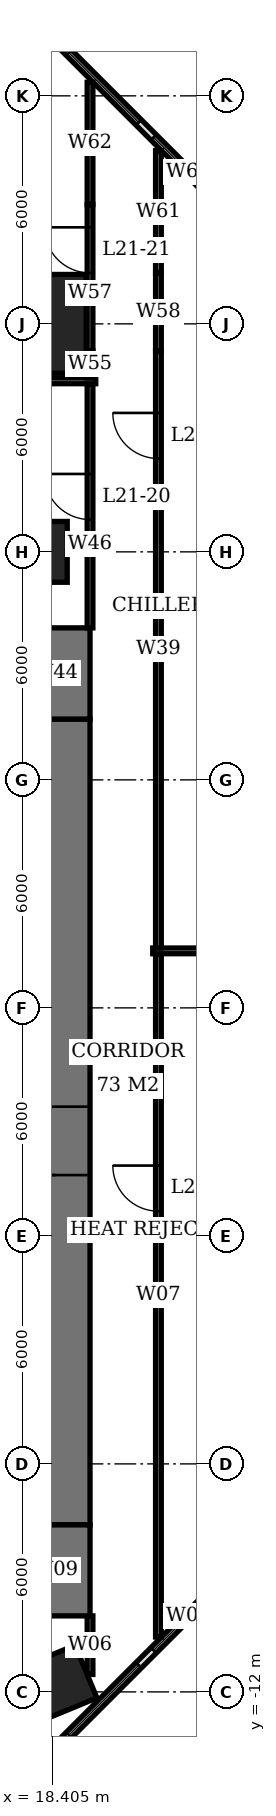
"""IFC4 building model, lengths in metres.
Left out: names, types, materials, properties, quantities, classifications, styles, units other than length and angle.
Written with IfcOpenShell. Run it as: python <this file> out.ifc"""

import sys

from ifc_helpers import new_model, si_unit, direction, frame, frame_2d, origin, origin_2d, place, context, subcontext, project, spatial, rectangle, extrude, element, fill, save


model = new_model("IFC4")
c1 = context("Model", 3, precision=1e-05, world=origin(), true_north=direction((0.0, 1.0)))
c2 = subcontext(c1, "Body", "Model", "MODEL_VIEW")
j1 = project(units=[si_unit("LENGTHUNIT", "METRE"), si_unit("PLANEANGLEUNIT", "RADIAN")], contexts=[c1])
p1 = place(None, origin())
s1 = spatial("IfcSite", under=j1, at=p1, CompositionType="ELEMENT")
p2 = place(p1, origin())
s2 = spatial("IfcBuilding", under=s1, at=p2, CompositionType="ELEMENT")
p3 = place(p2, frame((0.0, 0.0, 88.4)))
s3 = spatial("IfcBuildingStorey", under=s2, at=p3, CompositionType="ELEMENT", Elevation=88.4)
p4 = place(p3, frame((18.0, -12.0, 0.0), z_axis=(0.0, 0.0, 1.0), x_axis=(-0.923879532511, -0.382683432365, 0.0)))
e1 = element("IfcColumn", 1, at=p4, inside=s3, PredefinedType="COLUMN", context=c2, shape_type="SweptSolid", body=[
    extrude(rectangle(XDim=2.8, YDim=1.5, at=origin_2d()), origin(), (0.0, 0.0, 1.0), 5.4),
])
p5 = place(p3, frame((18.0, 18.0, 0.0), z_axis=(0.0, 0.0, 1.0), x_axis=(1.0, 0.0, 0.0)))
e2 = element("IfcColumn", 2, at=p5, inside=s3, PredefinedType="COLUMN", context=c2, shape_type="SweptSolid", body=[
    extrude(rectangle(XDim=1.6, YDim=1.6, at=origin_2d()), origin(), (0.0, 0.0, 1.0), 5.4),
])
p6 = place(p3, frame((18.0, 24.0, 0.0), z_axis=(0.0, 0.0, 1.0), x_axis=(1.0, 0.0, 0.0)))
e3 = element("IfcColumn", 3, at=p6, inside=s3, PredefinedType="COLUMN", context=c2, shape_type="SweptSolid", body=[
    extrude(rectangle(XDim=2.6, YDim=2.6, at=origin_2d()), origin(), (0.0, 0.0, 1.0), 5.4),
])
p7 = place(p3, frame((18.5, -7.6, 0.0), z_axis=(0.0, 0.0, 1.0), x_axis=(0.0, 1.0, 0.0)))
e4 = element("IfcWall", 4, at=p7, inside=s3, PredefinedType="SHEAR", context=c2, shape_type="SweptSolid", body=[
    extrude(rectangle(XDim=21.2, YDim=1.8, at=frame_2d((10.6, 0.0))), origin(), (0.0, 0.0, 1.0), 5.4),
])
p8 = place(p7, frame((9.2, 0.0, 0.0)))
e5 = element("IfcOpeningElement", 5, at=p8, cuts=e4, PredefinedType="OPENING", context=c2, shape_type="SweptSolid", body=[
    extrude(rectangle(XDim=1.8, YDim=2.4, at=frame_2d((0.9, 1.2))), frame((0.0, 0.91, 0.0), z_axis=(0.0, -1.0, 0.0), x_axis=(1.0, 0.0, 0.0)), (0.0, 0.0, 1.0), 1.82),
])
for number, where, z_axis, x_axis in (
    (6, (18.5, -10.0, 0.0), (0.0, 0.0, 1.0), (0.0, 1.0, 0.0)),
    (7, (18.5, 13.6, 0.0), (0.0, 0.0, 1.0), (0.0, 1.0, 0.0)),
):
    element("IfcWall", number, at=place(p3, frame(where, z_axis=z_axis, x_axis=x_axis)), inside=s3, PredefinedType="SHEAR", context=c2, shape_type="SweptSolid", body=[
        extrude(rectangle(XDim=2.4, YDim=1.8, at=frame_2d((1.2, 0.0))), origin(), (0.0, 0.0, 1.0), 5.4),
    ])
p9 = place(p3, frame((18.651, -13.329, 0.0), z_axis=(0.0, 0.0, 1.0), x_axis=(0.707106781187, 0.707106781187, 0.0)))
e8 = element("IfcWall", 8, at=p9, inside=s3, PredefinedType="USERDEFINED", context=c2, shape_type="SweptSolid", body=[
    extrude(rectangle(XDim=9.445, YDim=0.2, at=frame_2d((4.723, 0.0))), origin(), (0.0, 0.0, 1.0), 5.4),
])
p10 = place(p9, frame((0.274, 0.0, 0.6)))
e9 = element("IfcOpeningElement", 9, at=p10, cuts=e8, PredefinedType="OPENING", context=c2, shape_type="SweptSolid", body=[
    extrude(rectangle(XDim=2.6, YDim=3.0, at=frame_2d((1.3, 1.5))), frame((0.0, 0.11, 0.0), z_axis=(0.0, -1.0, 0.0), x_axis=(1.0, 0.0, 0.0)), (0.0, 0.0, 1.0), 0.22),
])
p11 = place(p9, frame((3.423, 0.0, 0.6)))
e10 = element("IfcOpeningElement", 10, at=p11, cuts=e8, PredefinedType="OPENING", context=c2, shape_type="SweptSolid", body=[
    extrude(rectangle(XDim=2.6, YDim=3.0, at=frame_2d((1.3, 1.5))), frame((0.0, 0.11, 0.0), z_axis=(0.0, -1.0, 0.0), x_axis=(1.0, 0.0, 0.0)), (0.0, 0.0, 1.0), 0.22),
])
p12 = place(p9, frame((6.571, 0.0, 0.6)))
e11 = element("IfcOpeningElement", 11, at=p12, cuts=e8, PredefinedType="OPENING", context=c2, shape_type="SweptSolid", body=[
    extrude(rectangle(XDim=2.6, YDim=3.0, at=frame_2d((1.3, 1.5))), frame((0.0, 0.11, 0.0), z_axis=(0.0, -1.0, 0.0), x_axis=(1.0, 0.0, 0.0)), (0.0, 0.0, 1.0), 0.22),
])
p13 = place(p3, frame((25.329, 24.651, 0.0), z_axis=(0.0, 0.0, 1.0), x_axis=(-0.707106781187, 0.707106781187, 0.0)))
e12 = element("IfcWall", 12, at=p13, inside=s3, PredefinedType="USERDEFINED", context=c2, shape_type="SweptSolid", body=[
    extrude(rectangle(XDim=9.445, YDim=0.2, at=frame_2d((4.723, 0.0))), origin(), (0.0, 0.0, 1.0), 5.4),
])
p14 = place(p13, frame((0.274, 0.0, 0.6)))
e13 = element("IfcOpeningElement", 13, at=p14, cuts=e12, PredefinedType="OPENING", context=c2, shape_type="SweptSolid", body=[
    extrude(rectangle(XDim=2.6, YDim=3.0, at=frame_2d((1.3, 1.5))), frame((0.0, 0.11, 0.0), z_axis=(0.0, -1.0, 0.0), x_axis=(1.0, 0.0, 0.0)), (0.0, 0.0, 1.0), 0.22),
])
p15 = place(p13, frame((3.423, 0.0, 0.6)))
e14 = element("IfcOpeningElement", 14, at=p15, cuts=e12, PredefinedType="OPENING", context=c2, shape_type="SweptSolid", body=[
    extrude(rectangle(XDim=2.6, YDim=3.0, at=frame_2d((1.3, 1.5))), frame((0.0, 0.11, 0.0), z_axis=(0.0, -1.0, 0.0), x_axis=(1.0, 0.0, 0.0)), (0.0, 0.0, 1.0), 0.22),
])
p16 = place(p13, frame((6.571, 0.0, 0.6)))
e15 = element("IfcOpeningElement", 15, at=p16, cuts=e12, PredefinedType="OPENING", context=c2, shape_type="SweptSolid", body=[
    extrude(rectangle(XDim=2.6, YDim=3.0, at=frame_2d((1.3, 1.5))), frame((0.0, 0.11, 0.0), z_axis=(0.0, -1.0, 0.0), x_axis=(1.0, 0.0, 0.0)), (0.0, 0.0, 1.0), 0.22),
])
p17 = place(p3, frame((4.575, 22.5, 0.0), z_axis=(0.0, 0.0, 1.0), x_axis=(1.0, 0.0, 0.0)))
e16 = element("IfcWall", 16, at=p17, inside=s3, PredefinedType="PARTITIONING", context=c2, shape_type="SweptSolid", body=[
    extrude(rectangle(XDim=14.975, YDim=0.15, at=frame_2d((7.488, 0.0))), origin(), (0.0, 0.0, 1.0), 5.15),
])
p18 = place(p3, frame((19.4, -11.541, 0.0), z_axis=(0.0, 0.0, 1.0), x_axis=(0.0, 1.0, 0.0)))
e17 = element("IfcWall", 17, at=p18, inside=s3, PredefinedType="PARTITIONING", context=c2, shape_type="SweptSolid", body=[
    extrude(rectangle(XDim=1.541, YDim=0.15, at=frame_2d((0.77, 0.0))), origin(), (0.0, 0.0, 1.0), 5.15),
])
p19 = place(p3, frame((19.4, 16.0, 0.0), z_axis=(0.0, 0.0, 1.0), x_axis=(0.0, 1.0, 0.0)))
e18 = element("IfcWall", 18, at=p19, inside=s3, PredefinedType="PARTITIONING", context=c2, shape_type="SweptSolid", body=[
    extrude(rectangle(XDim=6.425, YDim=0.15, at=frame_2d((3.212, 0.0))), origin(), (0.0, 0.0, 1.0), 5.15),
])
p20 = place(p19, frame((2.85, 0.0, 0.0)))
e19 = element("IfcOpeningElement", 19, at=p20, cuts=e18, PredefinedType="OPENING", context=c2, shape_type="SweptSolid", body=[
    extrude(rectangle(XDim=1.2, YDim=2.4, at=frame_2d((0.6, 1.2))), frame((0.0, 0.085, 0.0), z_axis=(0.0, -1.0, 0.0), x_axis=(1.0, 0.0, 0.0)), (0.0, 0.0, 1.0), 0.17),
])
p21 = place(p3, frame((19.4, 22.575, 0.0), z_axis=(0.0, 0.0, 1.0), x_axis=(0.0, 1.0, 0.0)))
e20 = element("IfcWall", 20, at=p21, inside=s3, PredefinedType="PARTITIONING", context=c2, shape_type="SweptSolid", body=[
    extrude(rectangle(XDim=0.715, YDim=0.15, at=frame_2d((0.357, 0.0))), origin(), (0.0, 0.0, 1.0), 5.15),
])
p22 = place(p3, frame((19.4, 23.29, 0.0), z_axis=(0.0, 0.0, 1.0), x_axis=(0.0, 1.0, 0.0)))
e21 = element("IfcWall", 21, at=p22, inside=s3, PredefinedType="PARTITIONING", context=c2, shape_type="SweptSolid", body=[
    extrude(rectangle(XDim=3.85, YDim=0.15, at=frame_2d((1.925, 0.0))), origin(), (0.0, 0.0, 1.0), 4.15),
])
p23 = place(p22, frame((2.05, 0.0, 0.0)))
e22 = element("IfcOpeningElement", 22, at=p23, cuts=e21, PredefinedType="OPENING", context=c2, shape_type="SweptSolid", body=[
    extrude(rectangle(XDim=1.2, YDim=2.4, at=frame_2d((0.6, 1.2))), frame((0.0, 0.085, 0.0), z_axis=(0.0, -1.0, 0.0), x_axis=(1.0, 0.0, 0.0)), (0.0, 0.0, 1.0), 0.17),
])
p24 = place(p3, frame((19.4, 27.14, 0.0), z_axis=(0.0, 0.0, 1.0), x_axis=(0.0, 1.0, 0.0)))
e23 = element("IfcWall", 23, at=p24, inside=s3, PredefinedType="PARTITIONING", context=c2, shape_type="SweptSolid", body=[
    extrude(rectangle(XDim=3.216, YDim=0.15, at=frame_2d((1.608, 0.0))), origin(), (0.0, 0.0, 1.0), 5.15),
])
p25 = place(p3, frame((21.2, -10.556, 0.0), z_axis=(0.0, 0.0, 1.0), x_axis=(0.0, 1.0, 0.0)))
e24 = element("IfcWall", 24, at=p25, inside=s3, PredefinedType="PARTITIONING", context=c2, shape_type="SweptSolid", body=[
    extrude(rectangle(XDim=17.981, YDim=0.15, at=frame_2d((8.99, 0.0))), origin(), (0.0, 0.0, 1.0), 5.15),
])
p26 = place(p25, frame((11.206, 0.0, 0.0)))
e25 = element("IfcOpeningElement", 25, at=p26, cuts=e24, PredefinedType="OPENING", context=c2, shape_type="SweptSolid", body=[
    extrude(rectangle(XDim=1.2, YDim=2.4, at=frame_2d((0.6, 1.2))), frame((0.0, 0.085, 0.0), z_axis=(0.0, -1.0, 0.0), x_axis=(1.0, 0.0, 0.0)), (0.0, 0.0, 1.0), 0.17),
])
p27 = place(p3, frame((21.2, 7.575, 0.0), z_axis=(0.0, 0.0, 1.0), x_axis=(0.0, 1.0, 0.0)))
e26 = element("IfcWall", 26, at=p27, inside=s3, PredefinedType="PARTITIONING", context=c2, shape_type="SweptSolid", body=[
    extrude(rectangle(XDim=15.715, YDim=0.15, at=frame_2d((7.857, 0.0))), origin(), (0.0, 0.0, 1.0), 5.15),
])
p28 = place(p27, frame((12.881, 0.0, 0.0)))
e27 = element("IfcOpeningElement", 27, at=p28, cuts=e26, PredefinedType="OPENING", context=c2, shape_type="SweptSolid", body=[
    extrude(rectangle(XDim=1.2, YDim=2.4, at=frame_2d((0.6, 1.2))), frame((0.0, 0.085, 0.0), z_axis=(0.0, -1.0, 0.0), x_axis=(1.0, 0.0, 0.0)), (0.0, 0.0, 1.0), 0.17),
])
p29 = place(p3, frame((21.2, 23.29, 0.0), z_axis=(0.0, 0.0, 1.0), x_axis=(0.0, 1.0, 0.0)))
e28 = element("IfcWall", 28, at=p29, inside=s3, PredefinedType="PARTITIONING", context=c2, shape_type="SweptSolid", body=[
    extrude(rectangle(XDim=2.05, YDim=0.15, at=frame_2d((1.025, 0.0))), origin(), (0.0, 0.0, 1.0), 4.15),
])
p30 = place(p3, frame((21.2, 25.34, 0.0), z_axis=(0.0, 0.0, 1.0), x_axis=(0.0, 1.0, 0.0)))
e29 = element("IfcWall", 29, at=p30, inside=s3, PredefinedType="PARTITIONING", context=c2, shape_type="SweptSolid", body=[
    extrude(rectangle(XDim=3.216, YDim=0.15, at=frame_2d((1.608, 0.0))), origin(), (0.0, 0.0, 1.0), 5.15),
])
p31 = place(p3, frame((21.05, 7.5, 0.0), z_axis=(0.0, 0.0, 1.0), x_axis=(1.0, 0.0, 0.0)))
e30 = element("IfcWall", 30, at=p31, inside=s3, PredefinedType="PARTITIONING", context=c2, shape_type="SweptSolid", body=[
    extrude(rectangle(XDim=4.25, YDim=0.15, at=frame_2d((2.125, 0.0))), origin(), (0.0, 0.0, 1.0), 5.15),
])
p32 = place(p10, origin())
e31 = element("IfcWindow", 31, at=p32, inside=s3, PartitioningType="SINGLE_PANEL", PredefinedType="USERDEFINED", context=c2, shape_type="SweptSolid", body=[
    extrude(rectangle(XDim=2.6, YDim=3.0, at=frame_2d((1.3, 1.5))), frame((0.0, 0.03, 0.0), z_axis=(0.0, -1.0, 0.0), x_axis=(1.0, 0.0, 0.0)), (0.0, 0.0, 1.0), 0.06),
])
fill(e9, e31)
p33 = place(p11, origin())
e32 = element("IfcWindow", 32, at=p33, inside=s3, PartitioningType="SINGLE_PANEL", PredefinedType="USERDEFINED", context=c2, shape_type="SweptSolid", body=[
    extrude(rectangle(XDim=2.6, YDim=3.0, at=frame_2d((1.3, 1.5))), frame((0.0, 0.03, 0.0), z_axis=(0.0, -1.0, 0.0), x_axis=(1.0, 0.0, 0.0)), (0.0, 0.0, 1.0), 0.06),
])
fill(e10, e32)
p34 = place(p15, origin())
e33 = element("IfcWindow", 33, at=p34, inside=s3, PartitioningType="SINGLE_PANEL", PredefinedType="USERDEFINED", context=c2, shape_type="SweptSolid", body=[
    extrude(rectangle(XDim=2.6, YDim=3.0, at=frame_2d((1.3, 1.5))), frame((0.0, 0.03, 0.0), z_axis=(0.0, -1.0, 0.0), x_axis=(1.0, 0.0, 0.0)), (0.0, 0.0, 1.0), 0.06),
])
fill(e14, e33)
p35 = place(p16, origin())
e34 = element("IfcWindow", 34, at=p35, inside=s3, PartitioningType="SINGLE_PANEL", PredefinedType="USERDEFINED", context=c2, shape_type="SweptSolid", body=[
    extrude(rectangle(XDim=2.6, YDim=3.0, at=frame_2d((1.3, 1.5))), frame((0.0, 0.03, 0.0), z_axis=(0.0, -1.0, 0.0), x_axis=(1.0, 0.0, 0.0)), (0.0, 0.0, 1.0), 0.06),
])
fill(e15, e34)
p36 = place(p8, origin())
e35 = element("IfcDoor", 35, at=p36, inside=s3, OperationType="DOUBLE_DOOR_SINGLE_SWING", PredefinedType="DOOR", context=c2, shape_type="SweptSolid", body=[
    extrude(rectangle(XDim=1.8, YDim=2.4, at=frame_2d((0.9, 1.2))), frame((0.0, 0.025, 0.0), z_axis=(0.0, -1.0, 0.0), x_axis=(1.0, 0.0, 0.0)), (0.0, 0.0, 1.0), 0.05),
])
fill(e5, e35)
p37 = place(p26, origin())
e36 = element("IfcDoor", 36, at=p37, inside=s3, OperationType="SINGLE_SWING_RIGHT", PredefinedType="DOOR", context=c2, shape_type="SweptSolid", body=[
    extrude(rectangle(XDim=1.2, YDim=2.4, at=frame_2d((0.6, 1.2))), frame((0.0, 0.025, 0.0), z_axis=(0.0, -1.0, 0.0), x_axis=(1.0, 0.0, 0.0)), (0.0, 0.0, 1.0), 0.05),
])
fill(e25, e36)
p38 = place(p28, origin())
e37 = element("IfcDoor", 37, at=p38, inside=s3, OperationType="SINGLE_SWING_RIGHT", PredefinedType="DOOR", context=c2, shape_type="SweptSolid", body=[
    extrude(rectangle(XDim=1.2, YDim=2.4, at=frame_2d((0.6, 1.2))), frame((0.0, 0.025, 0.0), z_axis=(0.0, -1.0, 0.0), x_axis=(1.0, 0.0, 0.0)), (0.0, 0.0, 1.0), 0.05),
])
fill(e27, e37)
p39 = place(p20, origin())
e38 = element("IfcDoor", 38, at=p39, inside=s3, OperationType="SINGLE_SWING_RIGHT", PredefinedType="DOOR", context=c2, shape_type="SweptSolid", body=[
    extrude(rectangle(XDim=1.2, YDim=2.4, at=frame_2d((0.6, 1.2))), frame((0.0, 0.025, 0.0), z_axis=(0.0, -1.0, 0.0), x_axis=(1.0, 0.0, 0.0)), (0.0, 0.0, 1.0), 0.05),
])
fill(e19, e38)
p40 = place(p23, origin())
e39 = element("IfcDoor", 39, at=p40, inside=s3, OperationType="SINGLE_SWING_RIGHT", PredefinedType="DOOR", context=c2, shape_type="SweptSolid", body=[
    extrude(rectangle(XDim=1.2, YDim=2.4, at=frame_2d((0.6, 1.2))), frame((0.0, 0.025, 0.0), z_axis=(0.0, -1.0, 0.0), x_axis=(1.0, 0.0, 0.0)), (0.0, 0.0, 1.0), 0.05),
])
fill(e22, e39)
save(model, sys.argv[1])
